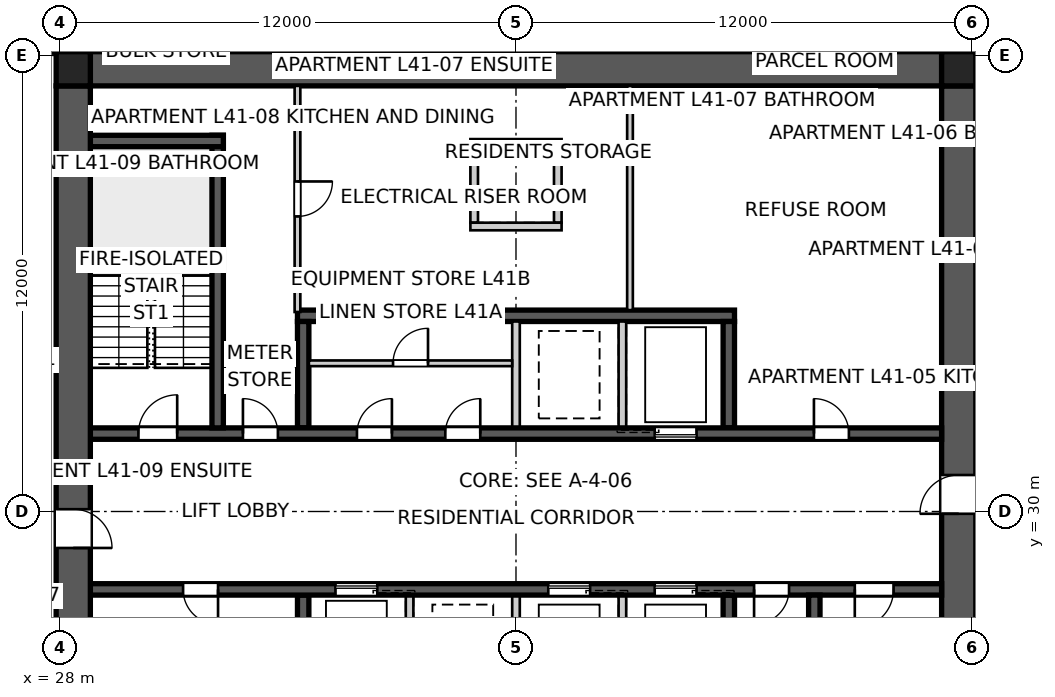
"""IFC4 building model, lengths in metres.
Left out: names, types, materials, properties, quantities, classifications, styles, units other than length and angle.
Written with IfcOpenShell. Run it as: python <this file> out.ifc"""

import sys

from ifc_helpers import new_model, si_unit, direction, frame, frame_2d, origin, origin_2d, place, context, subcontext, project, spatial, polyline, rectangle, outline, extrude, element, fill, save


model = new_model("IFC4")
c1 = context("Model", 3, precision=1e-05, world=origin(), true_north=direction((0.0, 1.0)))
c2 = subcontext(c1, "Body", "Model", "MODEL_VIEW")
j1 = project(units=[si_unit("LENGTHUNIT", "METRE"), si_unit("PLANEANGLEUNIT", "RADIAN")], contexts=[c1])
p1 = place(None, origin())
s1 = spatial("IfcSite", under=j1, at=p1, CompositionType="ELEMENT")
p2 = place(p1, origin())
s2 = spatial("IfcBuilding", under=s1, at=p2, CompositionType="ELEMENT")
p3 = place(p2, frame((0.0, 0.0, 150.6)))
s3 = spatial("IfcBuildingStorey", under=s2, at=p3, CompositionType="ELEMENT", Elevation=150.6)
p4 = place(p3, frame((28.8, 41.65, 0.0), z_axis=(0.0, 0.0, 1.0), x_axis=(1.0, 0.0, 0.0)))
e1 = element("IfcWall", 1, at=p4, inside=s3, PredefinedType="SHEAR", context=c2, shape_type="SweptSolid", body=[
    extrude(outline(polyline([(0.0, -0.45), (22.4, -0.45), (22.4, -0.025), (22.85, -0.025), (22.85, 0.025), (22.4, 0.025), (22.4, 0.45), (0.0, 0.45), (0.0, 0.025), (-0.45, 0.025), (-0.45, -0.025), (0.0, -0.025), (0.0, -0.45)])), origin(), (0.0, 0.0, 1.0), 3.4),
])
p5 = place(p3, frame((51.65, 18.8, 0.0), z_axis=(0.0, 0.0, 1.0), x_axis=(0.0, 1.0, 0.0)))
e2 = element("IfcWall", 2, at=p5, inside=s3, PredefinedType="SHEAR", context=c2, shape_type="SweptSolid", body=[
    extrude(outline(polyline([(0.0, -0.45), (22.4, -0.45), (22.4, -0.025), (22.85, -0.025), (22.85, 0.025), (22.4, 0.025), (22.4, 0.45), (0.0, 0.45), (0.0, 0.025), (-0.45, 0.025), (-0.45, -0.025), (0.0, -0.025), (0.0, -0.45)])), origin(), (0.0, 0.0, 1.0), 3.4),
])
p6 = place(p5, frame((11.14, 0.0, 0.0)))
e3 = element("IfcOpeningElement", 3, at=p6, cuts=e2, PredefinedType="OPENING", context=c2, shape_type="SweptSolid", body=[
    extrude(rectangle(XDim=1.02, YDim=2.4, at=frame_2d((0.51, 1.2))), frame((0.0, 0.46, 0.0), z_axis=(0.0, -1.0, 0.0), x_axis=(1.0, 0.0, 0.0)), (0.0, 0.0, 1.0), 0.92),
])
p7 = place(p3, frame((28.35, 41.2, 0.0), z_axis=(0.0, 0.0, 1.0), x_axis=(0.0, -1.0, 0.0)))
e4 = element("IfcWall", 4, at=p7, inside=s3, PredefinedType="SHEAR", context=c2, shape_type="SweptSolid", body=[
    extrude(outline(polyline([(0.0, -0.45), (22.4, -0.45), (22.4, -0.025), (22.85, -0.025), (22.85, 0.025), (22.4, 0.025), (22.4, 0.45), (0.0, 0.45), (0.0, 0.025), (-0.45, 0.025), (-0.45, -0.025), (0.0, -0.025), (0.0, -0.45)])), origin(), (0.0, 0.0, 1.0), 3.4),
])
p8 = place(p7, frame((11.14, 0.0, 0.0)))
e5 = element("IfcOpeningElement", 5, at=p8, cuts=e4, PredefinedType="OPENING", context=c2, shape_type="SweptSolid", body=[
    extrude(rectangle(XDim=1.02, YDim=2.4, at=frame_2d((0.51, 1.2))), frame((0.0, 0.46, 0.0), z_axis=(0.0, -1.0, 0.0), x_axis=(1.0, 0.0, 0.0)), (0.0, 0.0, 1.0), 0.92),
])
p9 = place(p3, frame((28.8, 32.05, 0.0), z_axis=(0.0, 0.0, 1.0), x_axis=(1.0, 0.0, 0.0)))
e6 = element("IfcWall", 6, at=p9, inside=s3, PredefinedType="SHEAR", context=c2, shape_type="SweptSolid", body=[
    extrude(rectangle(XDim=22.4, YDim=0.3, at=frame_2d((11.2, 0.0))), origin(), (0.0, 0.0, 1.0), 3.4),
])
p10 = place(p9, frame((19.04, 0.0, 0.0)))
e7 = element("IfcOpeningElement", 7, at=p10, cuts=e6, PredefinedType="OPENING", context=c2, shape_type="SweptSolid", body=[
    extrude(rectangle(XDim=0.92, YDim=2.1, at=frame_2d((0.46, 1.05))), frame((0.0, 0.16, 0.0), z_axis=(0.0, -1.0, 0.0), x_axis=(1.0, 0.0, 0.0)), (0.0, 0.0, 1.0), 0.32),
])
p11 = place(p9, frame((1.265, 0.0, 0.0)))
e8 = element("IfcOpeningElement", 8, at=p11, cuts=e6, PredefinedType="OPENING", context=c2, shape_type="SweptSolid", body=[
    extrude(rectangle(XDim=1.02, YDim=2.1, at=frame_2d((0.51, 1.05))), frame((0.0, 0.16, 0.0), z_axis=(0.0, -1.0, 0.0), x_axis=(1.0, 0.0, 0.0)), (0.0, 0.0, 1.0), 0.32),
])
p12 = place(p9, frame((4.015, 0.0, 0.0)))
e9 = element("IfcOpeningElement", 9, at=p12, cuts=e6, PredefinedType="OPENING", context=c2, shape_type="SweptSolid", body=[
    extrude(rectangle(XDim=0.92, YDim=2.1, at=frame_2d((0.46, 1.05))), frame((0.0, 0.16, 0.0), z_axis=(0.0, -1.0, 0.0), x_axis=(1.0, 0.0, 0.0)), (0.0, 0.0, 1.0), 0.32),
])
p13 = place(p9, frame((7.015, 0.0, 0.0)))
e10 = element("IfcOpeningElement", 10, at=p13, cuts=e6, PredefinedType="OPENING", context=c2, shape_type="SweptSolid", body=[
    extrude(rectangle(XDim=0.92, YDim=2.1, at=frame_2d((0.46, 1.05))), frame((0.0, 0.16, 0.0), z_axis=(0.0, -1.0, 0.0), x_axis=(1.0, 0.0, 0.0)), (0.0, 0.0, 1.0), 0.32),
])
p14 = place(p9, frame((9.34, 0.0, 0.0)))
e11 = element("IfcOpeningElement", 11, at=p14, cuts=e6, PredefinedType="OPENING", context=c2, shape_type="SweptSolid", body=[
    extrude(rectangle(XDim=0.92, YDim=2.1, at=frame_2d((0.46, 1.05))), frame((0.0, 0.16, 0.0), z_axis=(0.0, -1.0, 0.0), x_axis=(1.0, 0.0, 0.0)), (0.0, 0.0, 1.0), 0.32),
])
p15 = place(p9, frame((14.85, 0.0, 0.0)))
e12 = element("IfcOpeningElement", 12, at=p15, cuts=e6, PredefinedType="OPENING", context=c2, shape_type="SweptSolid", body=[
    extrude(rectangle(XDim=1.1, YDim=2.1, at=frame_2d((0.55, 1.05))), frame((0.0, 0.16, 0.0), z_axis=(0.0, -1.0, 0.0), x_axis=(1.0, 0.0, 0.0)), (0.0, 0.0, 1.0), 0.32),
])
p16 = place(p3, frame((51.2, 27.95, 0.0), z_axis=(0.0, 0.0, 1.0), x_axis=(-1.0, 0.0, 0.0)))
e13 = element("IfcWall", 13, at=p16, inside=s3, PredefinedType="SHEAR", context=c2, shape_type="SweptSolid", body=[
    extrude(rectangle(XDim=22.4, YDim=0.3, at=frame_2d((11.2, 0.0))), origin(), (0.0, 0.0, 1.0), 3.4),
])
p17 = place(p16, frame((19.04, 0.0, 0.0)))
e14 = element("IfcOpeningElement", 14, at=p17, cuts=e13, PredefinedType="OPENING", context=c2, shape_type="SweptSolid", body=[
    extrude(rectangle(XDim=0.92, YDim=2.1, at=frame_2d((0.46, 1.05))), frame((0.0, 0.16, 0.0), z_axis=(0.0, -1.0, 0.0), x_axis=(1.0, 0.0, 0.0)), (0.0, 0.0, 1.0), 0.32),
])
p18 = place(p16, frame((1.265, 0.0, 0.0)))
e15 = element("IfcOpeningElement", 15, at=p18, cuts=e13, PredefinedType="OPENING", context=c2, shape_type="SweptSolid", body=[
    extrude(rectangle(XDim=1.02, YDim=2.1, at=frame_2d((0.51, 1.05))), frame((0.0, 0.16, 0.0), z_axis=(0.0, -1.0, 0.0), x_axis=(1.0, 0.0, 0.0)), (0.0, 0.0, 1.0), 0.32),
])
p19 = place(p16, frame((4.015, 0.0, 0.0)))
e16 = element("IfcOpeningElement", 16, at=p19, cuts=e13, PredefinedType="OPENING", context=c2, shape_type="SweptSolid", body=[
    extrude(rectangle(XDim=0.92, YDim=2.1, at=frame_2d((0.46, 1.05))), frame((0.0, 0.16, 0.0), z_axis=(0.0, -1.0, 0.0), x_axis=(1.0, 0.0, 0.0)), (0.0, 0.0, 1.0), 0.32),
])
p20 = place(p16, frame((6.45, 0.0, 0.0)))
e17 = element("IfcOpeningElement", 17, at=p20, cuts=e13, PredefinedType="OPENING", context=c2, shape_type="SweptSolid", body=[
    extrude(rectangle(XDim=1.1, YDim=2.1, at=frame_2d((0.55, 1.05))), frame((0.0, 0.16, 0.0), z_axis=(0.0, -1.0, 0.0), x_axis=(1.0, 0.0, 0.0)), (0.0, 0.0, 1.0), 0.32),
])
p21 = place(p16, frame((9.25, 0.0, 0.0)))
e18 = element("IfcOpeningElement", 18, at=p21, cuts=e13, PredefinedType="OPENING", context=c2, shape_type="SweptSolid", body=[
    extrude(rectangle(XDim=1.1, YDim=2.1, at=frame_2d((0.55, 1.05))), frame((0.0, 0.16, 0.0), z_axis=(0.0, -1.0, 0.0), x_axis=(1.0, 0.0, 0.0)), (0.0, 0.0, 1.0), 0.32),
])
p22 = place(p16, frame((14.85, 0.0, 0.0)))
e19 = element("IfcOpeningElement", 19, at=p22, cuts=e13, PredefinedType="OPENING", context=c2, shape_type="SweptSolid", body=[
    extrude(rectangle(XDim=1.1, YDim=2.1, at=frame_2d((0.55, 1.05))), frame((0.0, 0.16, 0.0), z_axis=(0.0, -1.0, 0.0), x_axis=(1.0, 0.0, 0.0)), (0.0, 0.0, 1.0), 0.32),
])
p23 = place(p3, frame((34.25, 35.15, 0.0), z_axis=(0.0, 0.0, 1.0), x_axis=(1.0, 0.0, 0.0)))
e20 = element("IfcWall", 20, at=p23, inside=s3, PredefinedType="SHEAR", context=c2, shape_type="SweptSolid", body=[
    extrude(rectangle(XDim=11.5, YDim=0.3, at=frame_2d((5.75, 0.0))), origin(), (0.0, 0.0, 1.0), 3.4),
])
for number, where, z_axis, x_axis in (
    (21, (34.4, 32.2, 0.0), (0.0, 0.0, 1.0), (0.0, 1.0, 0.0)),
    (22, (45.6, 27.8, 0.0), (0.0, 0.0, 1.0), (0.0, -1.0, 0.0)),
):
    element("IfcWall", number, at=place(p3, frame(where, z_axis=z_axis, x_axis=x_axis)), inside=s3, PredefinedType="SHEAR", context=c2, shape_type="SweptSolid", body=[
        extrude(rectangle(XDim=2.8, YDim=0.3, at=frame_2d((1.4, 0.0))), origin(), (0.0, 0.0, 1.0), 3.4),
    ])
for number, where, z_axis, x_axis in (
    (23, (42.8, 27.8, 0.0), (0.0, 0.0, 1.0), (0.0, -1.0, 0.0)),
    (24, (40.0, 32.2, 0.0), (0.0, 0.0, 1.0), (0.0, 1.0, 0.0)),
    (25, (40.0, 27.8, 0.0), (0.0, 0.0, 1.0), (0.0, -1.0, 0.0)),
    (26, (42.8, 32.2, 0.0), (0.0, 0.0, 1.0), (0.0, 1.0, 0.0)),
    (27, (37.2, 27.8, 0.0), (0.0, 0.0, 1.0), (0.0, -1.0, 0.0)),
):
    element("IfcWall", number, at=place(p3, frame(where, z_axis=z_axis, x_axis=x_axis)), inside=s3, PredefinedType="SOLIDWALL", context=c2, shape_type="SweptSolid", body=[
        extrude(rectangle(XDim=2.8, YDim=0.2, at=frame_2d((1.4, 0.0))), origin(), (0.0, 0.0, 1.0), 3.4),
    ])
for number, where, z_axis, x_axis in (
    (28, (45.6, 32.2, 0.0), (0.0, 0.0, 1.0), (0.0, 1.0, 0.0)),
    (29, (34.4, 27.8, 0.0), (0.0, 0.0, 1.0), (0.0, -1.0, 0.0)),
):
    element("IfcWall", number, at=place(p3, frame(where, z_axis=z_axis, x_axis=x_axis)), inside=s3, PredefinedType="SHEAR", context=c2, shape_type="SweptSolid", body=[
        extrude(rectangle(XDim=2.8, YDim=0.3, at=frame_2d((1.4, 0.0))), origin(), (0.0, 0.0, 1.0), 3.4),
    ])
p24 = place(p3, frame((32.15, 32.2, 0.0), z_axis=(0.0, 0.0, 1.0), x_axis=(0.0, 1.0, 0.0)))
e30 = element("IfcWall", 30, at=p24, inside=s3, PredefinedType="SHEAR", context=c2, shape_type="SweptSolid", body=[
    extrude(rectangle(XDim=7.7, YDim=0.3, at=frame_2d((3.85, 0.0))), origin(), (0.0, 0.0, 1.0), 3.4),
])
p25 = place(p3, frame((28.8, 39.75, 0.0), z_axis=(0.0, 0.0, 1.0), x_axis=(1.0, 0.0, 0.0)))
e31 = element("IfcWall", 31, at=p25, inside=s3, PredefinedType="SHEAR", context=c2, shape_type="SweptSolid", body=[
    extrude(rectangle(XDim=3.5, YDim=0.3, at=frame_2d((1.75, 0.0))), origin(), (0.0, 0.0, 1.0), 3.4),
])
p26 = place(p3, frame((47.85, 27.8, 0.0), z_axis=(0.0, 0.0, 1.0), x_axis=(0.0, -1.0, 0.0)))
e32 = element("IfcWall", 32, at=p26, inside=s3, PredefinedType="SHEAR", context=c2, shape_type="SweptSolid", body=[
    extrude(rectangle(XDim=7.7, YDim=0.3, at=frame_2d((3.85, 0.0))), origin(), (0.0, 0.0, 1.0), 3.4),
])
for number, where, z_axis, x_axis in (
    (33, (38.9, 37.6, 0.0), (0.0, 0.0, 1.0), (0.0, 1.0, 0.0)),
    (34, (41.1, 37.6, 0.0), (0.0, 0.0, 1.0), (0.0, 1.0, 0.0)),
):
    element("IfcWall", number, at=place(p3, frame(where, z_axis=z_axis, x_axis=x_axis)), inside=s3, PredefinedType="SOLIDWALL", context=c2, shape_type="SweptSolid", body=[
        extrude(rectangle(XDim=2.0, YDim=0.2, at=frame_2d((1.0, 0.0))), origin(), (0.0, 0.0, 1.0), 3.4),
    ])
for number, where, z_axis, x_axis in (
    (35, (38.8, 37.5, 0.0), (0.0, 0.0, 1.0), (1.0, 0.0, 0.0)),
    (36, (38.8, 39.7, 0.0), (0.0, 0.0, 1.0), (1.0, 0.0, 0.0)),
):
    element("IfcWall", number, at=place(p3, frame(where, z_axis=z_axis, x_axis=x_axis)), inside=s3, PredefinedType="SOLIDWALL", context=c2, shape_type="SweptSolid", body=[
        extrude(rectangle(XDim=2.4, YDim=0.2, at=frame_2d((1.2, 0.0))), origin(), (0.0, 0.0, 1.0), 3.4),
    ])
for number, where, z_axis, x_axis in (
    (37, (51.65, 41.65, 0.0), (0.0, 0.0, 1.0), (1.0, 0.0, 0.0)),
    (38, (28.35, 41.65, 0.0), (0.0, 0.0, 1.0), (1.0, 0.0, 0.0)),
):
    element("IfcColumn", number, at=place(p3, frame(where, z_axis=z_axis, x_axis=x_axis)), inside=s3, PredefinedType="COLUMN", context=c2, shape_type="SweptSolid", body=[
        extrude(rectangle(XDim=0.9, YDim=0.9, at=origin_2d()), origin(), (0.0, 0.0, 1.0), 3.4),
    ])
p27 = place(p3, frame((34.25, 41.2, 0.0), z_axis=(0.0, 0.0, 1.0), x_axis=(0.0, -1.0, 0.0)))
e39 = element("IfcWall", 39, at=p27, inside=s3, PredefinedType="SOLIDWALL", context=c2, shape_type="SweptSolid", body=[
    extrude(rectangle(XDim=5.95, YDim=0.15, at=frame_2d((2.975, 0.0))), origin(), (0.0, 0.0, 1.0), 3.25),
])
p28 = place(p27, frame((2.515, 0.0, 0.0)))
e40 = element("IfcOpeningElement", 40, at=p28, cuts=e39, PredefinedType="OPENING", context=c2, shape_type="SweptSolid", body=[
    extrude(rectangle(XDim=0.92, YDim=2.1, at=frame_2d((0.46, 1.05))), frame((0.0, 0.085, 0.0), z_axis=(0.0, -1.0, 0.0), x_axis=(1.0, 0.0, 0.0)), (0.0, 0.0, 1.0), 0.17),
])
p29 = place(p3, frame((43.0, 41.2, 0.0), z_axis=(0.0, 0.0, 1.0), x_axis=(0.0, -1.0, 0.0)))
e41 = element("IfcWall", 41, at=p29, inside=s3, PredefinedType="SOLIDWALL", context=c2, shape_type="SweptSolid", body=[
    extrude(rectangle(XDim=5.9, YDim=0.15, at=frame_2d((2.95, 0.0))), origin(), (0.0, 0.0, 1.0), 3.25),
])
p30 = place(p3, frame((27.9, 44.35, 0.0), z_axis=(0.0, 0.0, 1.0), x_axis=(0.0, -1.0, 0.0)))
e42 = element("IfcWall", 42, at=p30, inside=s3, PredefinedType="PARTITIONING", context=c2, shape_type="SweptSolid", body=[
    extrude(rectangle(XDim=2.3, YDim=0.2, at=frame_2d((1.15, 0.0))), origin(), (0.0, 0.0, 1.0), 3.25),
])
p31 = place(p3, frame((52.1, 41.18, 0.0), z_axis=(0.0, 0.0, 1.0), x_axis=(0.0, 1.0, 0.0)))
e43 = element("IfcWall", 43, at=p31, inside=s3, PredefinedType="PARTITIONING", context=c2, shape_type="SweptSolid", body=[
    extrude(rectangle(XDim=3.17, YDim=0.2, at=frame_2d((1.585, 0.0))), origin(), (0.0, 0.0, 1.0), 3.25),
])
p32 = place(p3, frame((34.55, 33.9, 0.0), z_axis=(0.0, 0.0, 1.0), x_axis=(1.0, 0.0, 0.0)))
e44 = element("IfcWall", 44, at=p32, inside=s3, PredefinedType="SOLIDWALL", context=c2, shape_type="SweptSolid", body=[
    extrude(rectangle(XDim=5.35, YDim=0.15, at=frame_2d((2.675, 0.0))), origin(), (0.0, 0.0, 1.0), 3.25),
])
p33 = place(p32, frame((2.215, 0.0, 0.0)))
e45 = element("IfcOpeningElement", 45, at=p33, cuts=e44, PredefinedType="OPENING", context=c2, shape_type="SweptSolid", body=[
    extrude(rectangle(XDim=0.92, YDim=2.1, at=frame_2d((0.46, 1.05))), frame((0.0, 0.085, 0.0), z_axis=(0.0, -1.0, 0.0), x_axis=(1.0, 0.0, 0.0)), (0.0, 0.0, 1.0), 0.17),
])
p34 = place(p10, origin())
e46 = element("IfcDoor", 46, at=p34, inside=s3, OperationType="SINGLE_SWING_LEFT", PredefinedType="DOOR", context=c2, shape_type="SweptSolid", body=[
    extrude(rectangle(XDim=0.92, YDim=2.1, at=frame_2d((0.46, 1.05))), frame((0.0, 0.025, 0.0), z_axis=(0.0, -1.0, 0.0), x_axis=(1.0, 0.0, 0.0)), (0.0, 0.0, 1.0), 0.05),
])
fill(e7, e46)
p35 = place(p17, origin())
e47 = element("IfcDoor", 47, at=p35, inside=s3, OperationType="SINGLE_SWING_LEFT", PredefinedType="DOOR", context=c2, shape_type="SweptSolid", body=[
    extrude(rectangle(XDim=0.92, YDim=2.1, at=frame_2d((0.46, 1.05))), frame((0.0, 0.025, 0.0), z_axis=(0.0, -1.0, 0.0), x_axis=(1.0, 0.0, 0.0)), (0.0, 0.0, 1.0), 0.05),
])
fill(e14, e47)
p36 = place(p18, origin())
e48 = element("IfcDoor", 48, at=p36, inside=s3, OperationType="SINGLE_SWING_RIGHT", PredefinedType="DOOR", context=c2, shape_type="SweptSolid", body=[
    extrude(rectangle(XDim=1.02, YDim=2.1, at=frame_2d((0.51, 1.05))), frame((0.0, 0.025, 0.0), z_axis=(0.0, -1.0, 0.0), x_axis=(1.0, 0.0, 0.0)), (0.0, 0.0, 1.0), 0.05),
])
fill(e15, e48)
p37 = place(p11, origin())
e49 = element("IfcDoor", 49, at=p37, inside=s3, OperationType="SINGLE_SWING_RIGHT", PredefinedType="DOOR", context=c2, shape_type="SweptSolid", body=[
    extrude(rectangle(XDim=1.02, YDim=2.1, at=frame_2d((0.51, 1.05))), frame((0.0, 0.025, 0.0), z_axis=(0.0, -1.0, 0.0), x_axis=(1.0, 0.0, 0.0)), (0.0, 0.0, 1.0), 0.05),
])
fill(e8, e49)
p38 = place(p12, origin())
e50 = element("IfcDoor", 50, at=p38, inside=s3, OperationType="SINGLE_SWING_LEFT", PredefinedType="DOOR", context=c2, shape_type="SweptSolid", body=[
    extrude(rectangle(XDim=0.92, YDim=2.1, at=frame_2d((0.46, 1.05))), frame((0.0, 0.025, 0.0), z_axis=(0.0, -1.0, 0.0), x_axis=(1.0, 0.0, 0.0)), (0.0, 0.0, 1.0), 0.05),
])
fill(e9, e50)
p39 = place(p19, origin())
e51 = element("IfcDoor", 51, at=p39, inside=s3, OperationType="SINGLE_SWING_RIGHT", PredefinedType="DOOR", context=c2, shape_type="SweptSolid", body=[
    extrude(rectangle(XDim=0.92, YDim=2.1, at=frame_2d((0.46, 1.05))), frame((0.0, 0.025, 0.0), z_axis=(0.0, -1.0, 0.0), x_axis=(1.0, 0.0, 0.0)), (0.0, 0.0, 1.0), 0.05),
])
fill(e16, e51)
p40 = place(p28, origin())
e52 = element("IfcDoor", 52, at=p40, inside=s3, OperationType="SINGLE_SWING_LEFT", PredefinedType="DOOR", context=c2, shape_type="SweptSolid", body=[
    extrude(rectangle(XDim=0.92, YDim=2.1, at=frame_2d((0.46, 1.05))), frame((0.0, 0.025, 0.0), z_axis=(0.0, -1.0, 0.0), x_axis=(1.0, 0.0, 0.0)), (0.0, 0.0, 1.0), 0.05),
])
fill(e40, e52)
p41 = place(p13, origin())
e53 = element("IfcDoor", 53, at=p41, inside=s3, OperationType="SINGLE_SWING_RIGHT", PredefinedType="DOOR", context=c2, shape_type="SweptSolid", body=[
    extrude(rectangle(XDim=0.92, YDim=2.1, at=frame_2d((0.46, 1.05))), frame((0.0, 0.025, 0.0), z_axis=(0.0, -1.0, 0.0), x_axis=(1.0, 0.0, 0.0)), (0.0, 0.0, 1.0), 0.05),
])
fill(e10, e53)
p42 = place(p14, origin())
e54 = element("IfcDoor", 54, at=p42, inside=s3, OperationType="SINGLE_SWING_RIGHT", PredefinedType="DOOR", context=c2, shape_type="SweptSolid", body=[
    extrude(rectangle(XDim=0.92, YDim=2.1, at=frame_2d((0.46, 1.05))), frame((0.0, 0.025, 0.0), z_axis=(0.0, -1.0, 0.0), x_axis=(1.0, 0.0, 0.0)), (0.0, 0.0, 1.0), 0.05),
])
fill(e11, e54)
p43 = place(p33, origin())
e55 = element("IfcDoor", 55, at=p43, inside=s3, OperationType="SINGLE_SWING_RIGHT", PredefinedType="DOOR", context=c2, shape_type="SweptSolid", body=[
    extrude(rectangle(XDim=0.92, YDim=2.1, at=frame_2d((0.46, 1.05))), frame((0.0, 0.025, 0.0), z_axis=(0.0, -1.0, 0.0), x_axis=(1.0, 0.0, 0.0)), (0.0, 0.0, 1.0), 0.05),
])
fill(e45, e55)
p44 = place(p6, origin())
e56 = element("IfcDoor", 56, at=p44, inside=s3, OperationType="SINGLE_SWING_LEFT", PredefinedType="DOOR", context=c2, shape_type="SweptSolid", body=[
    extrude(rectangle(XDim=1.02, YDim=2.4, at=frame_2d((0.51, 1.2))), frame((0.0, 0.025, 0.0), z_axis=(0.0, -1.0, 0.0), x_axis=(1.0, 0.0, 0.0)), (0.0, 0.0, 1.0), 0.05),
])
fill(e3, e56)
p45 = place(p8, origin())
e57 = element("IfcDoor", 57, at=p45, inside=s3, OperationType="SINGLE_SWING_RIGHT", PredefinedType="DOOR", context=c2, shape_type="SweptSolid", body=[
    extrude(rectangle(XDim=1.02, YDim=2.4, at=frame_2d((0.51, 1.2))), frame((0.0, 0.025, 0.0), z_axis=(0.0, -1.0, 0.0), x_axis=(1.0, 0.0, 0.0)), (0.0, 0.0, 1.0), 0.05),
])
fill(e5, e57)
p46 = place(p20, origin())
e58 = element("IfcDoor", 58, at=p46, inside=s3, OperationType="SLIDING_TO_LEFT", PredefinedType="DOOR", context=c2, shape_type="SweptSolid", body=[
    extrude(rectangle(XDim=1.1, YDim=2.1, at=frame_2d((0.55, 1.05))), frame((0.0, 0.025, 0.0), z_axis=(0.0, -1.0, 0.0), x_axis=(1.0, 0.0, 0.0)), (0.0, 0.0, 1.0), 0.05),
])
fill(e17, e58)
p47 = place(p21, origin())
e59 = element("IfcDoor", 59, at=p47, inside=s3, OperationType="SLIDING_TO_LEFT", PredefinedType="DOOR", context=c2, shape_type="SweptSolid", body=[
    extrude(rectangle(XDim=1.1, YDim=2.1, at=frame_2d((0.55, 1.05))), frame((0.0, 0.025, 0.0), z_axis=(0.0, -1.0, 0.0), x_axis=(1.0, 0.0, 0.0)), (0.0, 0.0, 1.0), 0.05),
])
fill(e18, e59)
p48 = place(p15, origin())
e60 = element("IfcDoor", 60, at=p48, inside=s3, OperationType="SLIDING_TO_LEFT", PredefinedType="DOOR", context=c2, shape_type="SweptSolid", body=[
    extrude(rectangle(XDim=1.1, YDim=2.1, at=frame_2d((0.55, 1.05))), frame((0.0, 0.025, 0.0), z_axis=(0.0, -1.0, 0.0), x_axis=(1.0, 0.0, 0.0)), (0.0, 0.0, 1.0), 0.05),
])
fill(e12, e60)
p49 = place(p22, origin())
e61 = element("IfcDoor", 61, at=p49, inside=s3, OperationType="SLIDING_TO_LEFT", PredefinedType="DOOR", context=c2, shape_type="SweptSolid", body=[
    extrude(rectangle(XDim=1.1, YDim=2.1, at=frame_2d((0.55, 1.05))), frame((0.0, 0.025, 0.0), z_axis=(0.0, -1.0, 0.0), x_axis=(1.0, 0.0, 0.0)), (0.0, 0.0, 1.0), 0.05),
])
fill(e19, e61)
save(model, sys.argv[1])
